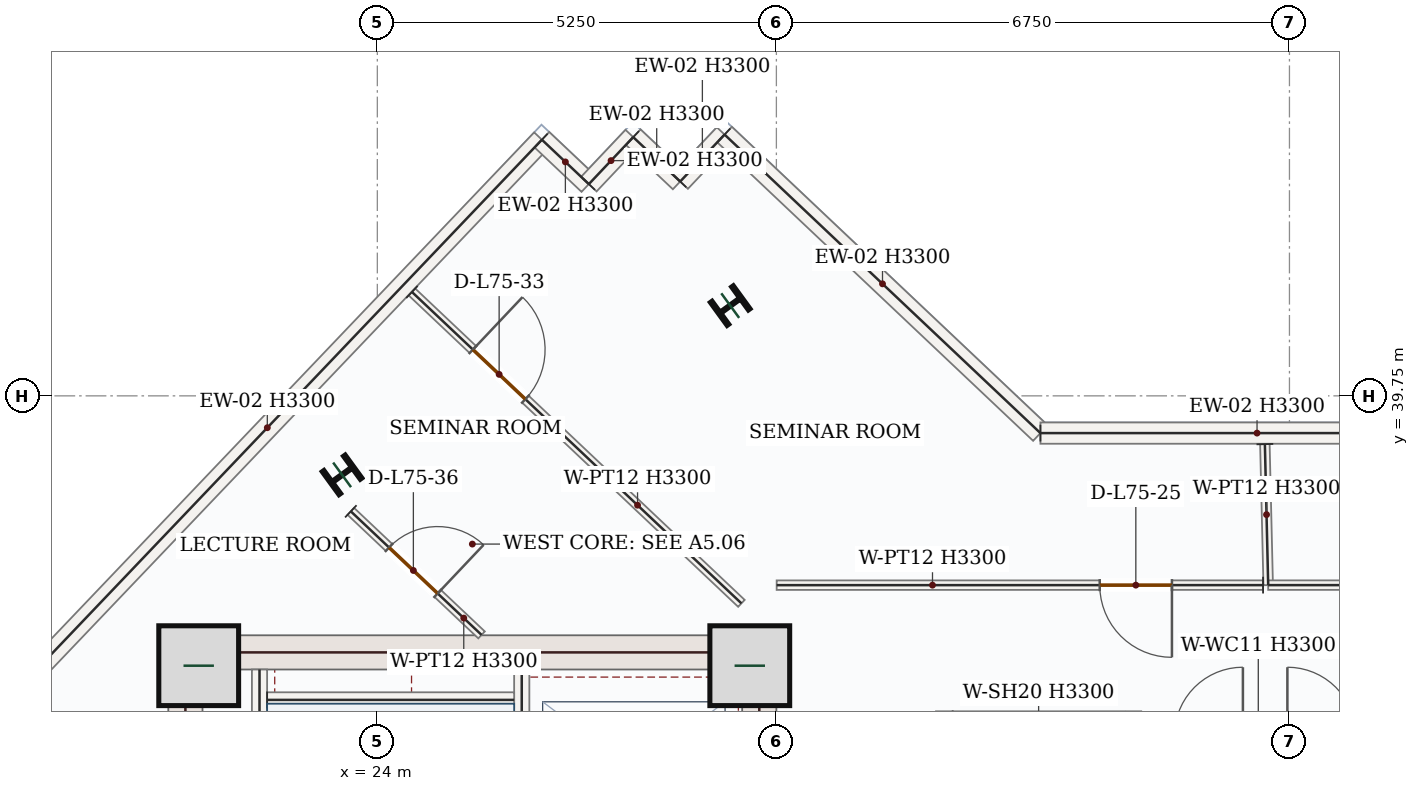
"""IFC4 building model, lengths in metres.
Left out: names, types, materials, properties, quantities, classifications, styles, units other than length and angle.
Written with IfcOpenShell. Run it as: python <this file> out.ifc"""

import sys

from ifc_helpers import new_model, si_unit, direction, frame, frame_2d, origin, origin_2d, place, context, subcontext, project, spatial, rectangle, i_section, extrude, source, transform, mapped, element, fill, save


model = new_model("IFC4")
c1 = context("Model", 3, precision=1e-05, world=origin(), true_north=direction((0.0, 1.0)))
c2 = subcontext(c1, "Body", "Model", "MODEL_VIEW")
j1 = project(units=[si_unit("LENGTHUNIT", "METRE"), si_unit("PLANEANGLEUNIT", "RADIAN")], contexts=[c1])
p1 = place(None, origin())
s1 = spatial("IfcSite", under=j1, at=p1, CompositionType="ELEMENT")
p2 = place(p1, origin())
s2 = spatial("IfcBuilding", under=s1, at=p2, CompositionType="ELEMENT")
p3 = place(p2, frame((0.0, 0.0, 310.35)))
s3 = spatial("IfcBuildingStorey", under=s2, at=p3, CompositionType="ELEMENT", Elevation=310.35)
m1 = source(origin(), c2, "Body", "SweptSolid", [
    extrude(rectangle(XDim=8.55, YDim=0.45, at=frame_2d((4.275, 0.0))), origin(), (0.0, 0.0, 1.0), 3.3),
])
p4 = place(p3, frame((21.475, 28.05, 0.0), z_axis=(0.0, 0.0, 1.0), x_axis=(0.0, 1.0, 0.0)))
e1 = element("IfcWall", 1, at=p4, inside=s3, PredefinedType="SHEAR", context=c2, shape_type="MappedRepresentation", body=[
    mapped(m1, transform((0.0, 0.0, 0.0), x_axis=(1.0, 0.0, 0.0), y_axis=(0.0, 1.0, 0.0), z_axis=(0.0, 0.0, 1.0), scale=1.0)),
])
p5 = place(p3, frame((29.025, 28.05, 0.0), z_axis=(0.0, 0.0, 1.0), x_axis=(0.0, 1.0, 0.0)))
e2 = element("IfcWall", 2, at=p5, inside=s3, PredefinedType="SHEAR", context=c2, shape_type="SweptSolid", body=[
    extrude(rectangle(XDim=8.55, YDim=0.45, at=frame_2d((4.275, 0.0))), origin(), (0.0, 0.0, 1.0), 3.3),
])
p6 = place(p5, frame((1.5, 0.0, 0.0)))
e3 = element("IfcOpeningElement", 3, at=p6, cuts=e2, PredefinedType="OPENING", context=c2, shape_type="SweptSolid", body=[
    extrude(rectangle(XDim=1.1, YDim=2.2, at=frame_2d((0.55, 1.1))), frame((0.0, 0.235, 0.0), z_axis=(0.0, -1.0, 0.0), x_axis=(1.0, 0.0, 0.0)), (0.0, 0.0, 1.0), 0.47),
])
m2 = source(origin(), c2, "Body", "SweptSolid", [
    extrude(rectangle(XDim=7.1, YDim=0.45, at=frame_2d((3.55, 0.0))), origin(), (0.0, 0.0, 1.0), 3.3),
])
p7 = place(p3, frame((21.7, 36.375, 0.0), z_axis=(0.0, 0.0, 1.0), x_axis=(1.0, 0.0, 0.0)))
e4 = element("IfcWall", 4, at=p7, inside=s3, PredefinedType="SHEAR", context=c2, shape_type="MappedRepresentation", body=[
    mapped(m2, transform((0.0, 0.0, 0.0), x_axis=(1.0, 0.0, 0.0), y_axis=(0.0, 1.0, 0.0), z_axis=(0.0, 0.0, 1.0), scale=1.0)),
])
m3 = source(origin(), c2, "Body", "SweptSolid", [
    extrude(rectangle(XDim=1.05, YDim=1.05, at=origin_2d()), origin(), (0.0, 0.0, 1.0), 3.75),
])
for number, where, z_axis, x_axis in (
    (5, (21.65, 36.2, 0.0), (0.0, 0.0, 1.0), (1.0, 0.0, 0.0)),
    (6, (28.9, 36.2, 0.0), (0.0, 0.0, 1.0), (1.0, 0.0, 0.0)),
):
    element("IfcColumn", number, at=place(p3, frame(where, z_axis=z_axis, x_axis=x_axis)), inside=s3, PredefinedType="COLUMN", context=c2, shape_type="MappedRepresentation", body=[
        mapped(m3, transform((0.0, 0.0, 0.0), x_axis=(1.0, 0.0, 0.0), y_axis=(0.0, 1.0, 0.0), z_axis=(0.0, 0.0, 1.0), scale=1.0)),
    ])
m4 = source(origin(), c2, "Body", "SweptSolid", [
    extrude(i_section(OverallWidth=0.374, OverallDepth=0.372, WebThickness=0.016, FlangeThickness=0.026, FilletRadius=0.018, at=origin_2d()), origin(), (0.0, 0.0, 1.0), 3.75),
])
for number, where, z_axis, x_axis in (
    (7, (28.643, 40.937, 0.0), (0.0, 0.0, 1.0), (-0.588, 0.809, 0.0)),
    (8, (23.536, 38.711, 0.0), (0.0, 0.0, 1.0), (-0.588, 0.809, 0.0)),
):
    element("IfcColumn", number, at=place(p3, frame(where, z_axis=z_axis, x_axis=x_axis)), inside=s3, PredefinedType="COLUMN", context=c2, shape_type="MappedRepresentation", body=[
        mapped(m4, transform((0.0, 0.0, 0.0), x_axis=(1.0, 0.0, 0.0), y_axis=(0.0, 1.0, 0.0), z_axis=(0.0, 0.0, 1.0), scale=1.0)),
    ])
m5 = source(origin(), c2, "Body", "SweptSolid", [
    extrude(rectangle(XDim=10.47, YDim=0.28, at=frame_2d((5.235, 0.0))), origin(), (0.0, 0.0, 1.0), 3.3),
])
p8 = place(p3, frame((18.94, 35.542, 0.0), z_axis=(0.0, 0.0, 1.0), x_axis=(0.690070788875, 0.723741878256, 0.0)))
e9 = element("IfcWall", 9, at=p8, inside=s3, PredefinedType="SOLIDWALL", context=c2, shape_type="MappedRepresentation", body=[
    mapped(m5, transform((0.0, 0.0, 0.0), x_axis=(1.0, 0.0, 0.0), y_axis=(0.0, 1.0, 0.0), z_axis=(0.0, 0.0, 1.0), scale=1.0)),
])
m6 = source(origin(), c2, "Body", "SweptSolid", [
    extrude(rectangle(XDim=0.85, YDim=0.28, at=frame_2d((0.425, 0.0))), origin(), (0.0, 0.0, 1.0), 3.3),
])
p9 = place(p3, frame((26.165, 43.12, 0.0), z_axis=(0.0, 0.0, 1.0), x_axis=(0.726790047388, -0.686859685101, 0.0)))
e10 = element("IfcWall", 10, at=p9, inside=s3, PredefinedType="SOLIDWALL", context=c2, shape_type="MappedRepresentation", body=[
    mapped(m6, transform((0.0, 0.0, 0.0), x_axis=(1.0, 0.0, 0.0), y_axis=(0.0, 1.0, 0.0), z_axis=(0.0, 0.0, 1.0), scale=1.0)),
])
m7 = source(origin(), c2, "Body", "SweptSolid", [
    extrude(rectangle(XDim=0.85, YDim=0.28, at=frame_2d((0.425, 0.0))), origin(), (0.0, 0.0, 1.0), 3.3),
])
p10 = place(p3, frame((26.783, 42.536, 0.0), z_axis=(0.0, 0.0, 1.0), x_axis=(0.687011382404, 0.726646654466, 0.0)))
e11 = element("IfcWall", 11, at=p10, inside=s3, PredefinedType="SOLIDWALL", context=c2, shape_type="MappedRepresentation", body=[
    mapped(m7, transform((0.0, 0.0, 0.0), x_axis=(1.0, 0.0, 0.0), y_axis=(0.0, 1.0, 0.0), z_axis=(0.0, 0.0, 1.0), scale=1.0)),
])
p11 = place(p3, frame((27.367, 43.154, 0.0), z_axis=(0.0, 0.0, 1.0), x_axis=(0.726790047388, -0.686859685101, 0.0)))
e12 = element("IfcWall", 12, at=p11, inside=s3, PredefinedType="SOLIDWALL", context=c2, shape_type="MappedRepresentation", body=[
    mapped(m6, transform((0.0, 0.0, 0.0), x_axis=(1.0, 0.0, 0.0), y_axis=(0.0, 1.0, 0.0), z_axis=(0.0, 0.0, 1.0), scale=1.0)),
])
p12 = place(p3, frame((27.984, 42.57, 0.0), z_axis=(0.0, 0.0, 1.0), x_axis=(0.687011382404, 0.726646654466, 0.0)))
e13 = element("IfcWall", 13, at=p12, inside=s3, PredefinedType="SOLIDWALL", context=c2, shape_type="MappedRepresentation", body=[
    mapped(m7, transform((0.0, 0.0, 0.0), x_axis=(1.0, 0.0, 0.0), y_axis=(0.0, 1.0, 0.0), z_axis=(0.0, 0.0, 1.0), scale=1.0)),
])
m8 = source(origin(), c2, "Body", "SweptSolid", [
    extrude(rectangle(XDim=5.718, YDim=0.28, at=frame_2d((2.859, 0.0))), origin(), (0.0, 0.0, 1.0), 3.3),
])
p13 = place(p3, frame((28.568, 43.188, 0.0), z_axis=(0.0, 0.0, 1.0), x_axis=(0.726765623086, -0.686885528382, 0.0)))
e14 = element("IfcWall", 14, at=p13, inside=s3, PredefinedType="SOLIDWALL", context=c2, shape_type="MappedRepresentation", body=[
    mapped(m8, transform((0.0, 0.0, 0.0), x_axis=(1.0, 0.0, 0.0), y_axis=(0.0, 1.0, 0.0), z_axis=(0.0, 0.0, 1.0), scale=1.0)),
])
m9 = source(origin(), c2, "Body", "SweptSolid", [
    extrude(rectangle(XDim=5.699, YDim=0.28, at=frame_2d((2.85, 0.0))), origin(), (0.0, 0.0, 1.0), 3.3),
])
p14 = place(p3, frame((32.724, 39.26, 0.0), z_axis=(0.0, 0.0, 1.0), x_axis=(1.0, 0.0, 0.0)))
e15 = element("IfcWall", 15, at=p14, inside=s3, PredefinedType="SOLIDWALL", context=c2, shape_type="MappedRepresentation", body=[
    mapped(m9, transform((0.0, 0.0, 0.0), x_axis=(1.0, 0.0, 0.0), y_axis=(0.0, 1.0, 0.0), z_axis=(0.0, 0.0, 1.0), scale=1.0)),
])
m10 = source(origin(), c2, "Body", "SweptSolid", [
    extrude(rectangle(XDim=7.87, YDim=0.2, at=frame_2d((3.935, 0.0))), origin(), (0.0, 0.0, 1.0), 3.3),
])
p15 = place(p3, frame((22.45, 28.28, 0.0), z_axis=(0.0, 0.0, 1.0), x_axis=(0.0, 1.0, 0.0)))
e16 = element("IfcWall", 16, at=p15, inside=s3, PredefinedType="SOLIDWALL", context=c2, shape_type="MappedRepresentation", body=[
    mapped(m10, transform((0.0, 0.0, 0.0), x_axis=(1.0, 0.0, 0.0), y_axis=(0.0, 1.0, 0.0), z_axis=(0.0, 0.0, 1.0), scale=1.0)),
])
p16 = place(p3, frame((25.9, 28.15, 0.0), z_axis=(0.0, 0.0, 1.0), x_axis=(0.0, 1.0, 0.0)))
e17 = element("IfcWall", 17, at=p16, inside=s3, PredefinedType="SOLIDWALL", context=c2, shape_type="SweptSolid", body=[
    extrude(rectangle(XDim=8.0, YDim=0.2, at=frame_2d((4.0, 0.0))), origin(), (0.0, 0.0, 1.0), 3.3),
])
p17 = place(p16, frame((0.4, 0.0, 0.0)))
e18 = element("IfcOpeningElement", 18, at=p17, cuts=e17, PredefinedType="OPENING", context=c2, shape_type="SweptSolid", body=[
    extrude(rectangle(XDim=1.05, YDim=2.15, at=frame_2d((0.525, 1.075))), frame((0.0, 0.11, 0.0), z_axis=(0.0, -1.0, 0.0), x_axis=(1.0, 0.0, 0.0)), (0.0, 0.0, 1.0), 0.22),
])
m11 = source(origin(), c2, "Body", "SweptSolid", [
    extrude(rectangle(XDim=3.25, YDim=0.2, at=frame_2d((1.625, 0.0))), origin(), (0.0, 0.0, 1.0), 3.3),
])
p18 = place(p3, frame((22.55, 35.75, 0.0), z_axis=(0.0, 0.0, 1.0), x_axis=(1.0, 0.0, 0.0)))
e19 = element("IfcWall", 19, at=p18, inside=s3, PredefinedType="SOLIDWALL", context=c2, shape_type="MappedRepresentation", body=[
    mapped(m11, transform((0.0, 0.0, 0.0), x_axis=(1.0, 0.0, 0.0), y_axis=(0.0, 1.0, 0.0), z_axis=(0.0, 0.0, 1.0), scale=1.0)),
])
p19 = place(p3, frame((31.45, 33.2, 0.0), z_axis=(0.0, 0.0, 1.0), x_axis=(0.0, 1.0, 0.0)))
e20 = element("IfcWall", 20, at=p19, inside=s3, PredefinedType="SOLIDWALL", context=c2, shape_type="SweptSolid", body=[
    extrude(rectangle(XDim=2.4, YDim=0.2, at=frame_2d((1.2, 0.0))), origin(), (0.0, 0.0, 1.0), 3.3),
])
p20 = place(p19, frame((0.65, 0.0, 0.0)))
e21 = element("IfcOpeningElement", 21, at=p20, cuts=e20, PredefinedType="OPENING", context=c2, shape_type="SweptSolid", body=[
    extrude(rectangle(XDim=1.1, YDim=2.15, at=frame_2d((0.55, 1.075))), frame((0.0, 0.11, 0.0), z_axis=(0.0, -1.0, 0.0), x_axis=(1.0, 0.0, 0.0)), (0.0, 0.0, 1.0), 0.22),
])
m12 = source(origin(), c2, "Body", "SweptSolid", [
    extrude(rectangle(XDim=2.4, YDim=0.2, at=frame_2d((1.2, 0.0))), origin(), (0.0, 0.0, 1.0), 3.3),
])
p21 = place(p3, frame((33.95, 33.2, 0.0), z_axis=(0.0, 0.0, 1.0), x_axis=(0.0, 1.0, 0.0)))
e22 = element("IfcWall", 22, at=p21, inside=s3, PredefinedType="SOLIDWALL", context=c2, shape_type="MappedRepresentation", body=[
    mapped(m12, transform((0.0, 0.0, 0.0), x_axis=(1.0, 0.0, 0.0), y_axis=(0.0, 1.0, 0.0), z_axis=(0.0, 0.0, 1.0), scale=1.0)),
])
p22 = place(p3, frame((23.651, 38.231, 0.0), z_axis=(0.0, 0.0, 1.0), x_axis=(0.726735597886, -0.686917295433, 0.0)))
e23 = element("IfcWall", 23, at=p22, inside=s3, PredefinedType="PARTITIONING", context=c2, shape_type="SweptSolid", body=[
    extrude(rectangle(XDim=2.367, YDim=0.125, at=frame_2d((1.183, 0.0))), origin(), (0.0, 0.0, 1.0), 3.3),
])
p23 = place(p22, frame((0.692, 0.0, 0.0)))
e24 = element("IfcOpeningElement", 24, at=p23, cuts=e23, PredefinedType="OPENING", context=c2, shape_type="SweptSolid", body=[
    extrude(rectangle(XDim=0.88, YDim=2.1, at=frame_2d((0.44, 1.05))), frame((0.0, 0.073, 0.0), z_axis=(0.0, -1.0, 0.0), x_axis=(1.0, 0.0, 0.0)), (0.0, 0.0, 1.0), 0.145),
])
p24 = place(p3, frame((24.456, 41.117, 0.0), z_axis=(0.0, 0.0, 1.0), x_axis=(0.726761082497, -0.686890332562, 0.0)))
e25 = element("IfcWall", 25, at=p24, inside=s3, PredefinedType="PARTITIONING", context=c2, shape_type="SweptSolid", body=[
    extrude(rectangle(XDim=5.964, YDim=0.125, at=frame_2d((2.982, 0.0))), origin(), (0.0, 0.0, 1.0), 3.3),
])
p25 = place(p24, frame((1.103, 0.0, 0.0)))
e26 = element("IfcOpeningElement", 26, at=p25, cuts=e25, PredefinedType="OPENING", context=c2, shape_type="SweptSolid", body=[
    extrude(rectangle(XDim=0.95, YDim=2.15, at=frame_2d((0.475, 1.075))), frame((0.0, 0.073, 0.0), z_axis=(0.0, -1.0, 0.0), x_axis=(1.0, 0.0, 0.0)), (0.0, 0.0, 1.0), 0.145),
])
m13 = source(origin(), c2, "Body", "SweptSolid", [
    extrude(rectangle(XDim=1.855, YDim=0.125, at=frame_2d((0.928, 0.0))), origin(), (0.0, 0.0, 1.0), 3.3),
])
p26 = place(p3, frame((35.677, 39.115, 0.0), z_axis=(0.0, 0.0, 1.0), x_axis=(0.023420791501, -0.999725695641, 0.0)))
e27 = element("IfcWall", 27, at=p26, inside=s3, PredefinedType="PARTITIONING", context=c2, shape_type="MappedRepresentation", body=[
    mapped(m13, transform((0.0, 0.0, 0.0), x_axis=(1.0, 0.0, 0.0), y_axis=(0.0, 1.0, 0.0), z_axis=(0.0, 0.0, 1.0), scale=1.0)),
])
p27 = place(p3, frame((35.653, 37.26, 0.0), z_axis=(0.0, 0.0, 1.0), x_axis=(-0.999999997089, -7.6303842e-05, 0.0)))
e28 = element("IfcWall", 28, at=p27, inside=s3, PredefinedType="PARTITIONING", context=c2, shape_type="SweptSolid", body=[
    extrude(rectangle(XDim=6.399, YDim=0.125, at=frame_2d((3.2, 0.0))), origin(), (0.0, 0.0, 1.0), 3.3),
])
p28 = place(p27, frame((1.199, 0.0, 0.0)))
e29 = element("IfcOpeningElement", 29, at=p28, cuts=e28, PredefinedType="OPENING", context=c2, shape_type="SweptSolid", body=[
    extrude(rectangle(XDim=0.95, YDim=2.15, at=frame_2d((0.475, 1.075))), frame((0.0, 0.073, 0.0), z_axis=(0.0, -1.0, 0.0), x_axis=(1.0, 0.0, 0.0)), (0.0, 0.0, 1.0), 0.145),
])
p29 = place(p3, frame((42.601, 37.26, 0.0), z_axis=(0.0, 0.0, 1.0), x_axis=(-1.0, 0.0, 0.0)))
e30 = element("IfcWall", 30, at=p29, inside=s3, PredefinedType="PARTITIONING", context=c2, shape_type="SweptSolid", body=[
    extrude(rectangle(XDim=6.881, YDim=0.125, at=frame_2d((3.44, 0.0))), origin(), (0.0, 0.0, 1.0), 3.3),
])
p30 = place(p29, frame((4.626, 0.0, 0.0)))
e31 = element("IfcOpeningElement", 31, at=p30, cuts=e30, PredefinedType="OPENING", context=c2, shape_type="SweptSolid", body=[
    extrude(rectangle(XDim=0.95, YDim=2.15, at=frame_2d((0.475, 1.075))), frame((0.0, 0.073, 0.0), z_axis=(0.0, -1.0, 0.0), x_axis=(1.0, 0.0, 0.0)), (0.0, 0.0, 1.0), 0.145),
])
m14 = source(origin(), c2, "Body", "SweptSolid", [
    extrude(rectangle(XDim=0.95, YDim=2.15, at=frame_2d((0.475, 1.075))), frame((0.0, 0.025, 0.0), z_axis=(0.0, -1.0, 0.0), x_axis=(1.0, 0.0, 0.0)), (0.0, 0.0, 1.0), 0.05),
])
p31 = place(p28, origin())
e32 = element("IfcDoor", 32, at=p31, inside=s3, OperationType="SINGLE_SWING_LEFT", PredefinedType="DOOR", context=c2, shape_type="MappedRepresentation", body=[
    mapped(m14, transform((0.0, 0.0, 0.0), x_axis=(1.0, 0.0, 0.0), y_axis=(0.0, 1.0, 0.0), z_axis=(0.0, 0.0, 1.0), scale=1.0)),
])
fill(e29, e32)
p32 = place(p25, origin())
e33 = element("IfcDoor", 33, at=p32, inside=s3, OperationType="SINGLE_SWING_LEFT", PredefinedType="DOOR", context=c2, shape_type="MappedRepresentation", body=[
    mapped(m14, transform((0.0, 0.0, 0.0), x_axis=(1.0, 0.0, 0.0), y_axis=(0.0, 1.0, 0.0), z_axis=(0.0, 0.0, 1.0), scale=1.0)),
])
fill(e26, e33)
m15 = source(origin(), c2, "Body", "SweptSolid", [
    extrude(rectangle(XDim=0.88, YDim=2.1, at=frame_2d((0.44, 1.05))), frame((0.0, 0.025, 0.0), z_axis=(0.0, -1.0, 0.0), x_axis=(1.0, 0.0, 0.0)), (0.0, 0.0, 1.0), 0.05),
])
p33 = place(p23, origin())
e34 = element("IfcDoor", 34, at=p33, inside=s3, OperationType="SINGLE_SWING_RIGHT", PredefinedType="DOOR", context=c2, shape_type="MappedRepresentation", body=[
    mapped(m15, transform((0.0, 0.0, 0.0), x_axis=(1.0, 0.0, 0.0), y_axis=(0.0, 1.0, 0.0), z_axis=(0.0, 0.0, 1.0), scale=1.0)),
])
fill(e24, e34)
save(model, sys.argv[1])
